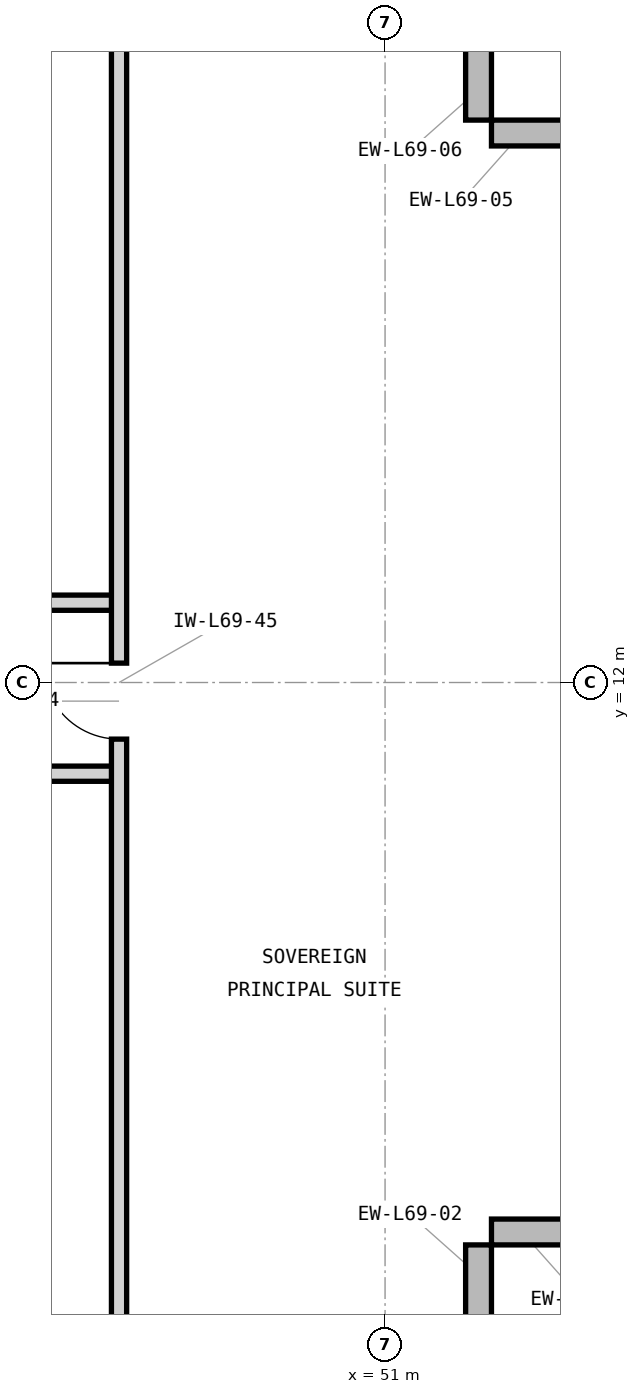
"""IFC4 building model, lengths in metres.
Left out: names, types, materials, properties, quantities, classifications, styles, units other than length and angle.
Written with IfcOpenShell. Run it as: python <this file> out.ifc"""

import sys

from ifc_helpers import new_model, si_unit, direction, frame, frame_2d, origin, place, context, subcontext, project, spatial, rectangle, extrude, element, fill, save


model = new_model("IFC4")
c1 = context("Model", 3, precision=1e-05, world=origin(), true_north=direction((0.0, 1.0)))
c2 = subcontext(c1, "Body", "Model", "MODEL_VIEW")
j1 = project(units=[si_unit("LENGTHUNIT", "METRE"), si_unit("PLANEANGLEUNIT", "RADIAN")], contexts=[c1])
p1 = place(None, origin())
s1 = spatial("IfcSite", under=j1, at=p1, CompositionType="ELEMENT")
p2 = place(p1, origin())
s2 = spatial("IfcBuilding", under=s1, at=p2, CompositionType="ELEMENT")
p3 = place(p2, frame((0.0, 0.0, 282.0)))
s3 = spatial("IfcBuildingStorey", under=s2, at=p3, CompositionType="ELEMENT", Elevation=282.0)
for number, where, z_axis, x_axis in (
    (1, (52.23, 3.0, 0.0), (0.0, 0.0, 1.0), (0.0, 1.0, 0.0)),
    (2, (52.4, 4.77, 0.0), (0.0, 0.0, 1.0), (1.0, 0.0, 0.0)),
    (3, (54.0, 19.23, 0.0), (0.0, 0.0, 1.0), (-1.0, 0.0, 0.0)),
    (4, (52.23, 19.4, 0.0), (0.0, 0.0, 1.0), (0.0, 1.0, 0.0)),
):
    element("IfcWall", number, at=place(p3, frame(where, z_axis=z_axis, x_axis=x_axis)), inside=s3, PredefinedType="STANDARD", context=c2, shape_type="SweptSolid", body=[
        extrude(rectangle(XDim=1.6, YDim=0.34, at=frame_2d((0.8, 0.0))), origin(), (0.0, 0.0, 1.0), 3.715),
    ])
p4 = place(p3, frame((38.7, 10.8, 0.0), z_axis=(0.0, 0.0, 1.0), x_axis=(1.0, 0.0, 0.0)))
e5 = element("IfcWall", 5, at=p4, inside=s3, PredefinedType="PARTITIONING", context=c2, shape_type="SweptSolid", body=[
    extrude(rectangle(XDim=8.8, YDim=0.2, at=frame_2d((4.4, 0.0))), origin(), (0.0, 0.0, 1.0), 3.63),
])
p5 = place(p4, frame((3.65, 0.0, 0.0)))
e6 = element("IfcOpeningElement", 6, at=p5, cuts=e5, PredefinedType="OPENING", context=c2, shape_type="SweptSolid", body=[
    extrude(rectangle(XDim=1.5, YDim=2.3, at=frame_2d((0.75, 1.15))), frame((0.0, 0.11, 0.0), z_axis=(0.0, -1.0, 0.0), x_axis=(1.0, 0.0, 0.0)), (0.0, 0.0, 1.0), 0.22),
])
p6 = place(p3, frame((40.7, 13.05, 0.0), z_axis=(0.0, 0.0, 1.0), x_axis=(1.0, 0.0, 0.0)))
e7 = element("IfcWall", 7, at=p6, inside=s3, PredefinedType="PARTITIONING", context=c2, shape_type="SweptSolid", body=[
    extrude(rectangle(XDim=6.8, YDim=0.2, at=frame_2d((3.4, 0.0))), origin(), (0.0, 0.0, 1.0), 3.63),
])
p7 = place(p6, frame((2.9, 0.0, 0.0)))
e8 = element("IfcOpeningElement", 8, at=p7, cuts=e7, PredefinedType="OPENING", context=c2, shape_type="SweptSolid", body=[
    extrude(rectangle(XDim=1.0, YDim=2.15, at=frame_2d((0.5, 1.075))), frame((0.0, 0.11, 0.0), z_axis=(0.0, -1.0, 0.0), x_axis=(1.0, 0.0, 0.0)), (0.0, 0.0, 1.0), 0.22),
])
p8 = place(p3, frame((47.5, 3.18, 0.0), z_axis=(0.0, 0.0, 1.0), x_axis=(0.0, 1.0, 0.0)))
e9 = element("IfcWall", 9, at=p8, inside=s3, PredefinedType="PARTITIONING", context=c2, shape_type="SweptSolid", body=[
    extrude(rectangle(XDim=17.64, YDim=0.2, at=frame_2d((8.82, 0.0))), origin(), (0.0, 0.0, 1.0), 3.63),
])
p9 = place(p8, frame((8.075, 0.0, 0.0)))
e10 = element("IfcOpeningElement", 10, at=p9, cuts=e9, PredefinedType="OPENING", context=c2, shape_type="SweptSolid", body=[
    extrude(rectangle(XDim=1.0, YDim=2.15, at=frame_2d((0.5, 1.075))), frame((0.0, 0.11, 0.0), z_axis=(0.0, -1.0, 0.0), x_axis=(1.0, 0.0, 0.0)), (0.0, 0.0, 1.0), 0.22),
])
p10 = place(p9, origin())
e11 = element("IfcDoor", 11, at=p10, inside=s3, OperationType="SINGLE_SWING_RIGHT", PredefinedType="DOOR", context=c2, shape_type="SweptSolid", body=[
    extrude(rectangle(XDim=1.0, YDim=2.15, at=frame_2d((0.5, 1.075))), frame((0.0, 0.025, 0.0), z_axis=(0.0, -1.0, 0.0), x_axis=(1.0, 0.0, 0.0)), (0.0, 0.0, 1.0), 0.05),
])
fill(e10, e11)
save(model, sys.argv[1])
